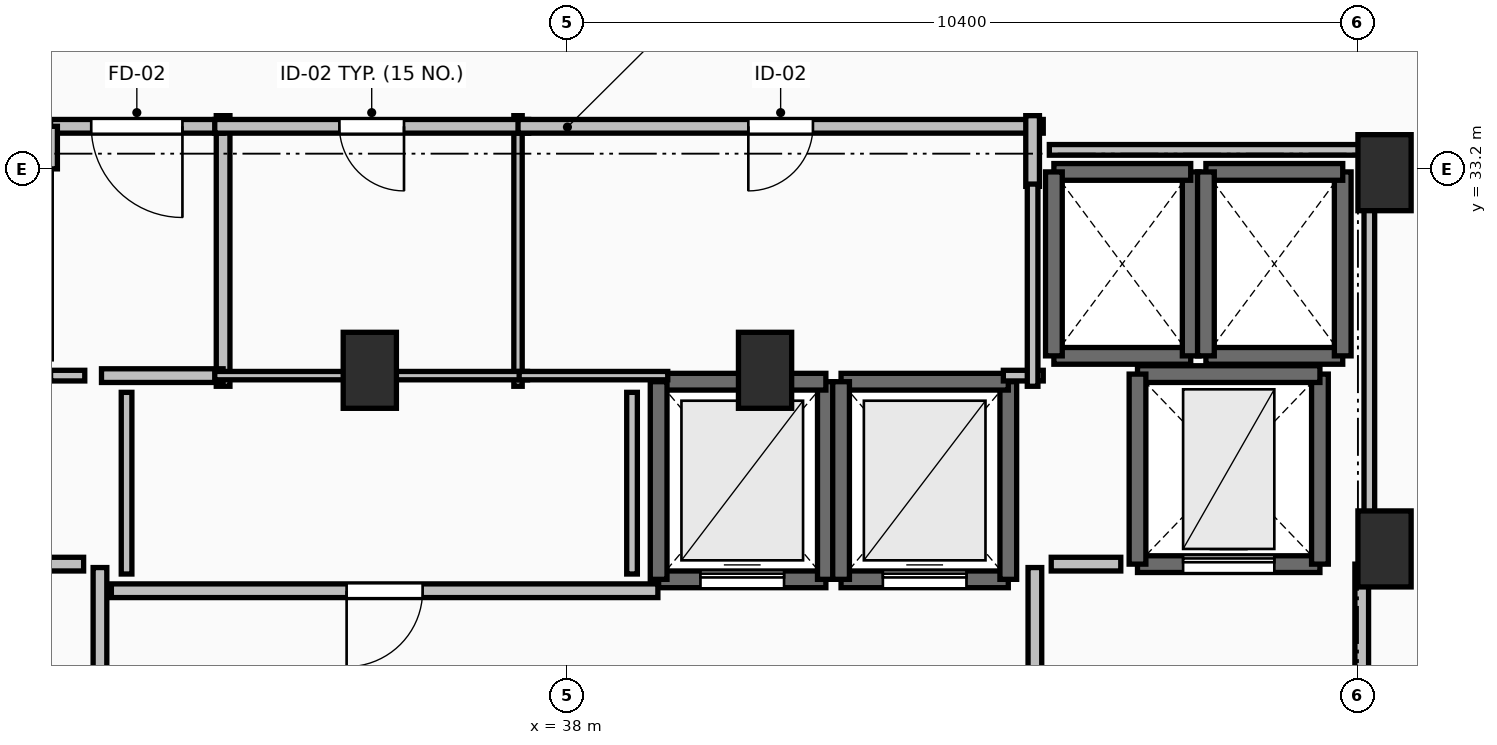
"""IFC4 building model, lengths in metres.
Left out: names, types, materials, properties, quantities, classifications, styles, units other than length and angle.
Written with IfcOpenShell. Run it as: python <this file> out.ifc"""

import sys

from ifc_helpers import new_model, si_unit, direction, frame, frame_2d, origin, origin_2d, place, context, subcontext, project, spatial, rectangle, extrude, element, fill, save


model = new_model("IFC4")
c1 = context("Model", 3, precision=1e-05, world=origin(), true_north=direction((0.0, 1.0)))
c2 = subcontext(c1, "Body", "Model", "MODEL_VIEW")
j1 = project(units=[si_unit("LENGTHUNIT", "METRE"), si_unit("PLANEANGLEUNIT", "RADIAN")], contexts=[c1])
p1 = place(None, origin())
s1 = spatial("IfcSite", under=j1, at=p1, CompositionType="ELEMENT")
p2 = place(p1, origin())
s2 = spatial("IfcBuilding", under=s1, at=p2, CompositionType="ELEMENT")
p3 = place(p2, frame((0.0, 0.0, 237.8)))
s3 = spatial("IfcBuildingStorey", under=s2, at=p3, CompositionType="ELEMENT", Elevation=237.8)
for number, where, z_axis, x_axis in (
    (1, (48.75, 33.15, 0.0), (0.0, 0.0, 1.0), (1.0, 0.0, 0.0)),
    (2, (48.75, 28.2, 0.0), (0.0, 0.0, 1.0), (1.0, 0.0, 0.0)),
    (3, (35.4, 30.55, 0.0), (0.0, 0.0, 1.0), (1.0, 0.0, 0.0)),
    (4, (40.6, 30.55, 0.0), (0.0, 0.0, 1.0), (1.0, 0.0, 0.0)),
):
    element("IfcColumn", number, at=place(p3, frame(where, z_axis=z_axis, x_axis=x_axis)), inside=s3, PredefinedType="PILASTER", context=c2, shape_type="SweptSolid", body=[
        extrude(rectangle(XDim=0.7, YDim=1.0, at=origin_2d()), origin(), (0.0, 0.0, 1.0), 3.55),
    ])
p4 = place(p3, frame((39.2, 27.8, 0.0), z_axis=(0.0, 0.0, 1.0), x_axis=(1.0, 0.0, 0.0)))
e5 = element("IfcWall", 5, at=p4, inside=s3, PredefinedType="SOLIDWALL", context=c2, shape_type="SweptSolid", body=[
    extrude(rectangle(XDim=2.2, YDim=0.22, at=frame_2d((1.1, 0.0))), origin(), (0.0, 0.0, 1.0), 3.29),
])
p5 = place(p4, frame((0.55, 0.0, 0.0)))
e6 = element("IfcOpeningElement", 6, at=p5, cuts=e5, PredefinedType="OPENING", context=c2, shape_type="SweptSolid", body=[
    extrude(rectangle(XDim=1.1, YDim=2.2, at=frame_2d((0.55, 1.1))), frame((0.0, 0.125, 0.0), z_axis=(0.0, -1.0, 0.0), x_axis=(1.0, 0.0, 0.0)), (0.0, 0.0, 1.0), 0.25),
])
p6 = place(p3, frame((41.4, 27.8, 0.0), z_axis=(0.0, 0.0, 1.0), x_axis=(0.0, 1.0, 0.0)))
e7 = element("IfcWall", 7, at=p6, inside=s3, PredefinedType="SOLIDWALL", context=c2, shape_type="SweptSolid", body=[
    extrude(rectangle(XDim=2.6, YDim=0.22, at=frame_2d((1.3, 0.0))), origin(), (0.0, 0.0, 1.0), 3.29),
])
p7 = place(p3, frame((41.4, 30.4, 0.0), z_axis=(0.0, 0.0, 1.0), x_axis=(-1.0, 0.0, 0.0)))
e8 = element("IfcWall", 8, at=p7, inside=s3, PredefinedType="SOLIDWALL", context=c2, shape_type="SweptSolid", body=[
    extrude(rectangle(XDim=2.2, YDim=0.22, at=frame_2d((1.1, 0.0))), origin(), (0.0, 0.0, 1.0), 3.29),
])
p8 = place(p3, frame((39.2, 30.4, 0.0), z_axis=(0.0, 0.0, 1.0), x_axis=(0.0, -1.0, 0.0)))
e9 = element("IfcWall", 9, at=p8, inside=s3, PredefinedType="SOLIDWALL", context=c2, shape_type="SweptSolid", body=[
    extrude(rectangle(XDim=2.6, YDim=0.22, at=frame_2d((1.3, 0.0))), origin(), (0.0, 0.0, 1.0), 3.29),
])
p9 = place(p3, frame((41.6, 27.8, 0.0), z_axis=(0.0, 0.0, 1.0), x_axis=(1.0, 0.0, 0.0)))
e10 = element("IfcWall", 10, at=p9, inside=s3, PredefinedType="SOLIDWALL", context=c2, shape_type="SweptSolid", body=[
    extrude(rectangle(XDim=2.2, YDim=0.22, at=frame_2d((1.1, 0.0))), origin(), (0.0, 0.0, 1.0), 3.29),
])
p10 = place(p9, frame((0.55, 0.0, 0.0)))
e11 = element("IfcOpeningElement", 11, at=p10, cuts=e10, PredefinedType="OPENING", context=c2, shape_type="SweptSolid", body=[
    extrude(rectangle(XDim=1.1, YDim=2.2, at=frame_2d((0.55, 1.1))), frame((0.0, 0.125, 0.0), z_axis=(0.0, -1.0, 0.0), x_axis=(1.0, 0.0, 0.0)), (0.0, 0.0, 1.0), 0.25),
])
p11 = place(p3, frame((43.8, 27.8, 0.0), z_axis=(0.0, 0.0, 1.0), x_axis=(0.0, 1.0, 0.0)))
e12 = element("IfcWall", 12, at=p11, inside=s3, PredefinedType="SOLIDWALL", context=c2, shape_type="SweptSolid", body=[
    extrude(rectangle(XDim=2.6, YDim=0.22, at=frame_2d((1.3, 0.0))), origin(), (0.0, 0.0, 1.0), 3.29),
])
p12 = place(p3, frame((43.8, 30.4, 0.0), z_axis=(0.0, 0.0, 1.0), x_axis=(-1.0, 0.0, 0.0)))
e13 = element("IfcWall", 13, at=p12, inside=s3, PredefinedType="SOLIDWALL", context=c2, shape_type="SweptSolid", body=[
    extrude(rectangle(XDim=2.2, YDim=0.22, at=frame_2d((1.1, 0.0))), origin(), (0.0, 0.0, 1.0), 3.29),
])
p13 = place(p3, frame((41.6, 30.4, 0.0), z_axis=(0.0, 0.0, 1.0), x_axis=(0.0, -1.0, 0.0)))
e14 = element("IfcWall", 14, at=p13, inside=s3, PredefinedType="SOLIDWALL", context=c2, shape_type="SweptSolid", body=[
    extrude(rectangle(XDim=2.6, YDim=0.22, at=frame_2d((1.3, 0.0))), origin(), (0.0, 0.0, 1.0), 3.29),
])
p14 = place(p3, frame((44.4, 30.74, 0.0), z_axis=(0.0, 0.0, 1.0), x_axis=(1.0, 0.0, 0.0)))
e15 = element("IfcWall", 15, at=p14, inside=s3, PredefinedType="SOLIDWALL", context=c2, shape_type="SweptSolid", body=[
    extrude(rectangle(XDim=1.8, YDim=0.22, at=frame_2d((0.9, 0.0))), origin(), (0.0, 0.0, 1.0), 3.29),
])
p15 = place(p3, frame((46.2, 30.74, 0.0), z_axis=(0.0, 0.0, 1.0), x_axis=(0.0, 1.0, 0.0)))
e16 = element("IfcWall", 16, at=p15, inside=s3, PredefinedType="SOLIDWALL", context=c2, shape_type="SweptSolid", body=[
    extrude(rectangle(XDim=2.42, YDim=0.22, at=frame_2d((1.21, 0.0))), origin(), (0.0, 0.0, 1.0), 3.29),
])
p16 = place(p3, frame((46.2, 33.16, 0.0), z_axis=(0.0, 0.0, 1.0), x_axis=(-1.0, 0.0, 0.0)))
e17 = element("IfcWall", 17, at=p16, inside=s3, PredefinedType="SOLIDWALL", context=c2, shape_type="SweptSolid", body=[
    extrude(rectangle(XDim=1.8, YDim=0.22, at=frame_2d((0.9, 0.0))), origin(), (0.0, 0.0, 1.0), 3.29),
])
p17 = place(p3, frame((44.4, 33.16, 0.0), z_axis=(0.0, 0.0, 1.0), x_axis=(0.0, -1.0, 0.0)))
e18 = element("IfcWall", 18, at=p17, inside=s3, PredefinedType="SOLIDWALL", context=c2, shape_type="SweptSolid", body=[
    extrude(rectangle(XDim=2.42, YDim=0.22, at=frame_2d((1.21, 0.0))), origin(), (0.0, 0.0, 1.0), 3.29),
])
p18 = place(p3, frame((46.4, 30.74, 0.0), z_axis=(0.0, 0.0, 1.0), x_axis=(1.0, 0.0, 0.0)))
e19 = element("IfcWall", 19, at=p18, inside=s3, PredefinedType="SOLIDWALL", context=c2, shape_type="SweptSolid", body=[
    extrude(rectangle(XDim=1.8, YDim=0.22, at=frame_2d((0.9, 0.0))), origin(), (0.0, 0.0, 1.0), 3.29),
])
p19 = place(p3, frame((48.2, 30.74, 0.0), z_axis=(0.0, 0.0, 1.0), x_axis=(0.0, 1.0, 0.0)))
e20 = element("IfcWall", 20, at=p19, inside=s3, PredefinedType="SOLIDWALL", context=c2, shape_type="SweptSolid", body=[
    extrude(rectangle(XDim=2.42, YDim=0.22, at=frame_2d((1.21, 0.0))), origin(), (0.0, 0.0, 1.0), 3.29),
])
p20 = place(p3, frame((48.2, 33.16, 0.0), z_axis=(0.0, 0.0, 1.0), x_axis=(-1.0, 0.0, 0.0)))
e21 = element("IfcWall", 21, at=p20, inside=s3, PredefinedType="SOLIDWALL", context=c2, shape_type="SweptSolid", body=[
    extrude(rectangle(XDim=1.8, YDim=0.22, at=frame_2d((0.9, 0.0))), origin(), (0.0, 0.0, 1.0), 3.29),
])
p21 = place(p3, frame((46.4, 33.16, 0.0), z_axis=(0.0, 0.0, 1.0), x_axis=(0.0, -1.0, 0.0)))
e22 = element("IfcWall", 22, at=p21, inside=s3, PredefinedType="SOLIDWALL", context=c2, shape_type="SweptSolid", body=[
    extrude(rectangle(XDim=2.42, YDim=0.22, at=frame_2d((1.21, 0.0))), origin(), (0.0, 0.0, 1.0), 3.29),
])
p22 = place(p3, frame((45.5, 28.0, 0.0), z_axis=(0.0, 0.0, 1.0), x_axis=(1.0, 0.0, 0.0)))
e23 = element("IfcWall", 23, at=p22, inside=s3, PredefinedType="SHEAR", context=c2, shape_type="SweptSolid", body=[
    extrude(rectangle(XDim=2.4, YDim=0.22, at=frame_2d((1.2, 0.0))), origin(), (0.0, 0.0, 1.0), 3.29),
])
p23 = place(p22, frame((0.6, 0.0, 0.0)))
e24 = element("IfcOpeningElement", 24, at=p23, cuts=e23, PredefinedType="OPENING", context=c2, shape_type="SweptSolid", body=[
    extrude(rectangle(XDim=1.2, YDim=2.2, at=frame_2d((0.6, 1.1))), frame((0.0, 0.125, 0.0), z_axis=(0.0, -1.0, 0.0), x_axis=(1.0, 0.0, 0.0)), (0.0, 0.0, 1.0), 0.25),
])
p24 = place(p3, frame((47.9, 28.0, 0.0), z_axis=(0.0, 0.0, 1.0), x_axis=(0.0, 1.0, 0.0)))
e25 = element("IfcWall", 25, at=p24, inside=s3, PredefinedType="SHEAR", context=c2, shape_type="SweptSolid", body=[
    extrude(rectangle(XDim=2.5, YDim=0.22, at=frame_2d((1.25, 0.0))), origin(), (0.0, 0.0, 1.0), 3.29),
])
p25 = place(p3, frame((47.9, 30.5, 0.0), z_axis=(0.0, 0.0, 1.0), x_axis=(-1.0, 0.0, 0.0)))
e26 = element("IfcWall", 26, at=p25, inside=s3, PredefinedType="SHEAR", context=c2, shape_type="SweptSolid", body=[
    extrude(rectangle(XDim=2.4, YDim=0.22, at=frame_2d((1.2, 0.0))), origin(), (0.0, 0.0, 1.0), 3.29),
])
p26 = place(p3, frame((45.5, 30.5, 0.0), z_axis=(0.0, 0.0, 1.0), x_axis=(0.0, -1.0, 0.0)))
e27 = element("IfcWall", 27, at=p26, inside=s3, PredefinedType="SHEAR", context=c2, shape_type="SweptSolid", body=[
    extrude(rectangle(XDim=2.5, YDim=0.22, at=frame_2d((1.25, 0.0))), origin(), (0.0, 0.0, 1.0), 3.29),
])
p27 = place(p3, frame((31.85, 24.045, 0.0), z_axis=(0.0, 0.0, 1.0), x_axis=(0.0, 1.0, 0.0)))
e28 = element("IfcWall", 28, at=p27, inside=s3, PredefinedType="PARTITIONING", context=c2, shape_type="SweptSolid", body=[
    extrude(rectangle(XDim=3.91, YDim=0.18, at=frame_2d((1.955, 0.0))), origin(), (0.0, 0.0, 1.0), 3.29),
])
p28 = place(p27, frame((1.355, 0.0, 0.0)))
e29 = element("IfcOpeningElement", 29, at=p28, cuts=e28, PredefinedType="OPENING", context=c2, shape_type="SweptSolid", body=[
    extrude(rectangle(XDim=1.2, YDim=2.15, at=frame_2d((0.6, 1.075))), frame((0.0, 0.105, 0.0), z_axis=(0.0, -1.0, 0.0), x_axis=(1.0, 0.0, 0.0)), (0.0, 0.0, 1.0), 0.21),
])
p29 = place(p3, frame((44.15, 27.955, 0.0), z_axis=(0.0, 0.0, 1.0), x_axis=(0.0, -1.0, 0.0)))
e30 = element("IfcWall", 30, at=p29, inside=s3, PredefinedType="PARTITIONING", context=c2, shape_type="SweptSolid", body=[
    extrude(rectangle(XDim=3.91, YDim=0.18, at=frame_2d((1.955, 0.0))), origin(), (0.0, 0.0, 1.0), 3.29),
])
p30 = place(p29, frame((1.355, 0.0, 0.0)))
e31 = element("IfcOpeningElement", 31, at=p30, cuts=e30, PredefinedType="OPENING", context=c2, shape_type="SweptSolid", body=[
    extrude(rectangle(XDim=1.2, YDim=2.15, at=frame_2d((0.6, 1.075))), frame((0.0, 0.105, 0.0), z_axis=(0.0, -1.0, 0.0), x_axis=(1.0, 0.0, 0.0)), (0.0, 0.0, 1.0), 0.21),
])
p31 = place(p3, frame((48.45, 23.95, 0.0), z_axis=(0.0, 0.0, 1.0), x_axis=(0.0, 1.0, 0.0)))
e32 = element("IfcWall", 32, at=p31, inside=s3, PredefinedType="PARTITIONING", context=c2, shape_type="SweptSolid", body=[
    extrude(rectangle(XDim=4.05, YDim=0.18, at=frame_2d((2.025, 0.0))), origin(), (0.0, 0.0, 1.0), 3.29),
])
p32 = place(p31, frame((1.425, 0.0, 0.0)))
e33 = element("IfcOpeningElement", 33, at=p32, cuts=e32, PredefinedType="OPENING", context=c2, shape_type="SweptSolid", body=[
    extrude(rectangle(XDim=1.2, YDim=2.15, at=frame_2d((0.6, 1.075))), frame((0.0, 0.105, 0.0), z_axis=(0.0, -1.0, 0.0), x_axis=(1.0, 0.0, 0.0)), (0.0, 0.0, 1.0), 0.21),
])
p33 = place(p3, frame((33.47, 30.34, 0.0), z_axis=(0.0, 0.0, 1.0), x_axis=(0.0, 1.0, 0.0)))
e34 = element("IfcWall", 34, at=p33, inside=s3, PredefinedType="PARTITIONING", context=c2, shape_type="SweptSolid", body=[
    extrude(rectangle(XDim=3.56, YDim=0.18, at=frame_2d((1.78, 0.0))), origin(), (0.0, 0.0, 1.0), 3.29),
])
p34 = place(p3, frame((31.87, 30.48, 0.0), z_axis=(0.0, 0.0, 1.0), x_axis=(1.0, 0.0, 0.0)))
e35 = element("IfcWall", 35, at=p34, inside=s3, PredefinedType="PARTITIONING", context=c2, shape_type="SweptSolid", body=[
    extrude(rectangle(XDim=1.6, YDim=0.18, at=frame_2d((0.8, 0.0))), origin(), (0.0, 0.0, 1.0), 3.29),
])
p35 = place(p3, frame((33.47, 33.76, 0.0), z_axis=(0.0, 0.0, 1.0), x_axis=(-1.0, 0.0, 0.0)))
e36 = element("IfcWall", 36, at=p35, inside=s3, PredefinedType="PARTITIONING", context=c2, shape_type="SweptSolid", body=[
    extrude(rectangle(XDim=2.27, YDim=0.18, at=frame_2d((1.135, 0.0))), origin(), (0.0, 0.0, 1.0), 3.29),
])
p36 = place(p35, frame((0.535, 0.0, 0.0)))
e37 = element("IfcOpeningElement", 37, at=p36, cuts=e36, PredefinedType="OPENING", context=c2, shape_type="SweptSolid", body=[
    extrude(rectangle(XDim=1.2, YDim=2.15, at=frame_2d((0.6, 1.075))), frame((0.0, 0.105, 0.0), z_axis=(0.0, -1.0, 0.0), x_axis=(1.0, 0.0, 0.0)), (0.0, 0.0, 1.0), 0.21),
])
p37 = place(p3, frame((31.2, 33.76, 0.0), z_axis=(0.0, 0.0, 1.0), x_axis=(0.0, -1.0, 0.0)))
e38 = element("IfcWall", 38, at=p37, inside=s3, PredefinedType="PARTITIONING", context=c2, shape_type="SweptSolid", body=[
    extrude(rectangle(XDim=0.56, YDim=0.18, at=frame_2d((0.28, 0.0))), origin(), (0.0, 0.0, 1.0), 3.29),
])
p38 = place(p3, frame((39.19, 27.65, 0.0), z_axis=(0.0, 0.0, 1.0), x_axis=(-1.0, 0.0, 0.0)))
e39 = element("IfcWall", 39, at=p38, inside=s3, PredefinedType="PARTITIONING", context=c2, shape_type="SweptSolid", body=[
    extrude(rectangle(XDim=7.19, YDim=0.18, at=frame_2d((3.595, 0.0))), origin(), (0.0, 0.0, 1.0), 3.29),
])
p39 = place(p38, frame((3.095, 0.0, 0.0)))
e40 = element("IfcOpeningElement", 40, at=p39, cuts=e39, PredefinedType="OPENING", context=c2, shape_type="SweptSolid", body=[
    extrude(rectangle(XDim=1.0, YDim=2.15, at=frame_2d((0.5, 1.075))), frame((0.0, 0.105, 0.0), z_axis=(0.0, -1.0, 0.0), x_axis=(1.0, 0.0, 0.0)), (0.0, 0.0, 1.0), 0.21),
])
p40 = place(p3, frame((37.35, 30.34, 0.0), z_axis=(0.0, 0.0, 1.0), x_axis=(0.0, 1.0, 0.0)))
e41 = element("IfcWall", 41, at=p40, inside=s3, PredefinedType="PARTITIONING", context=c2, shape_type="SweptSolid", body=[
    extrude(rectangle(XDim=3.56, YDim=0.11, at=frame_2d((1.78, 0.0))), origin(), (0.0, 0.0, 1.0), 2.482),
])
p41 = place(p3, frame((33.36, 30.48, 0.0), z_axis=(0.0, 0.0, 1.0), x_axis=(1.0, 0.0, 0.0)))
e42 = element("IfcWall", 42, at=p41, inside=s3, PredefinedType="PARTITIONING", context=c2, shape_type="SweptSolid", body=[
    extrude(rectangle(XDim=4.115, YDim=0.11, at=frame_2d((2.058, 0.0))), origin(), (0.0, 0.0, 1.0), 2.482),
])
p42 = place(p3, frame((37.49, 33.76, 0.0), z_axis=(0.0, 0.0, 1.0), x_axis=(-1.0, 0.0, 0.0)))
e43 = element("IfcWall", 43, at=p42, inside=s3, PredefinedType="PARTITIONING", context=c2, shape_type="SweptSolid", body=[
    extrude(rectangle(XDim=4.13, YDim=0.18, at=frame_2d((2.065, 0.0))), origin(), (0.0, 0.0, 1.0), 3.29),
])
p43 = place(p42, frame((1.64, 0.0, 0.0)))
e44 = element("IfcOpeningElement", 44, at=p43, cuts=e43, PredefinedType="OPENING", context=c2, shape_type="SweptSolid", body=[
    extrude(rectangle(XDim=0.85, YDim=2.1, at=frame_2d((0.425, 1.05))), frame((0.0, 0.105, 0.0), z_axis=(0.0, -1.0, 0.0), x_axis=(1.0, 0.0, 0.0)), (0.0, 0.0, 1.0), 0.21),
])
p44 = place(p3, frame((37.365, 30.48, 0.0), z_axis=(0.0, 0.0, 1.0), x_axis=(1.0, 0.0, 0.0)))
e45 = element("IfcWall", 45, at=p44, inside=s3, PredefinedType="PARTITIONING", context=c2, shape_type="SweptSolid", body=[
    extrude(rectangle(XDim=1.955, YDim=0.11, at=frame_2d((0.978, 0.0))), origin(), (0.0, 0.0, 1.0), 2.482),
])
p45 = place(p3, frame((44.26, 33.76, 0.0), z_axis=(0.0, 0.0, 1.0), x_axis=(-1.0, 0.0, 0.0)))
e46 = element("IfcWall", 46, at=p45, inside=s3, PredefinedType="PARTITIONING", context=c2, shape_type="SweptSolid", body=[
    extrude(rectangle(XDim=6.91, YDim=0.18, at=frame_2d((3.455, 0.0))), origin(), (0.0, 0.0, 1.0), 3.29),
])
p46 = place(p45, frame((3.03, 0.0, 0.0)))
e47 = element("IfcOpeningElement", 47, at=p46, cuts=e46, PredefinedType="OPENING", context=c2, shape_type="SweptSolid", body=[
    extrude(rectangle(XDim=0.85, YDim=2.1, at=frame_2d((0.425, 1.05))), frame((0.0, 0.105, 0.0), z_axis=(0.0, -1.0, 0.0), x_axis=(1.0, 0.0, 0.0)), (0.0, 0.0, 1.0), 0.21),
])
p47 = place(p3, frame((44.12, 32.97, 0.0), z_axis=(0.0, 0.0, 1.0), x_axis=(0.0, 1.0, 0.0)))
e48 = element("IfcWall", 48, at=p47, inside=s3, PredefinedType="PARTITIONING", context=c2, shape_type="SweptSolid", body=[
    extrude(rectangle(XDim=0.93, YDim=0.18, at=frame_2d((0.465, 0.0))), origin(), (0.0, 0.0, 1.0), 3.29),
])
for number, where, z_axis, x_axis in (
    (49, (31.635, 28.0, 0.0), (0.0, 0.0, 1.0), (-1.0, 0.0, 0.0)),
    (50, (45.28, 28.0, 0.0), (0.0, 0.0, 1.0), (-1.0, 0.0, 0.0)),
):
    element("IfcWall", number, at=place(p3, frame(where, z_axis=z_axis, x_axis=x_axis)), inside=s3, PredefinedType="PARTITIONING", context=c2, shape_type="SweptSolid", body=[
        extrude(rectangle(XDim=0.915, YDim=0.18, at=frame_2d((0.458, 0.0))), origin(), (0.0, 0.0, 1.0), 3.29),
    ])
p48 = place(p3, frame((31.2, 30.48, 0.0), z_axis=(0.0, 0.0, 1.0), x_axis=(1.0, 0.0, 0.0)))
e51 = element("IfcWall", 51, at=p48, inside=s3, PredefinedType="PARTITIONING", context=c2, shape_type="SweptSolid", body=[
    extrude(rectangle(XDim=0.45, YDim=0.14, at=frame_2d((0.225, 0.0))), origin(), (0.0, 0.0, 1.0), 3.29),
])
p49 = place(p3, frame((43.735, 30.48, 0.0), z_axis=(0.0, 0.0, 1.0), x_axis=(1.0, 0.0, 0.0)))
e52 = element("IfcWall", 52, at=p49, inside=s3, PredefinedType="PARTITIONING", context=c2, shape_type="SweptSolid", body=[
    extrude(rectangle(XDim=0.525, YDim=0.14, at=frame_2d((0.262, 0.0))), origin(), (0.0, 0.0, 1.0), 3.29),
])
p50 = place(p3, frame((44.12, 30.34, 0.0), z_axis=(0.0, 0.0, 1.0), x_axis=(0.0, 1.0, 0.0)))
e53 = element("IfcWall", 53, at=p50, inside=s3, PredefinedType="PARTITIONING", context=c2, shape_type="SweptSolid", body=[
    extrude(rectangle(XDim=2.66, YDim=0.14, at=frame_2d((1.33, 0.0))), origin(), (0.0, 0.0, 1.0), 3.29),
])
for number, where, z_axis, x_axis in (
    (54, (32.2, 30.26, 0.0), (0.0, 0.0, 1.0), (0.0, -1.0, 0.0)),
    (55, (38.85, 27.87, 0.0), (0.0, 0.0, 1.0), (0.0, 1.0, 0.0)),
):
    element("IfcWall", number, at=place(p3, frame(where, z_axis=z_axis, x_axis=x_axis)), inside=s3, PredefinedType="PARTITIONING", context=c2, shape_type="SweptSolid", body=[
        extrude(rectangle(XDim=2.39, YDim=0.14, at=frame_2d((1.195, 0.0))), origin(), (0.0, 0.0, 1.0), 3.29),
    ])
p51 = place(p3, frame((48.55, 28.196, 0.0), z_axis=(0.0, 0.0, 1.0), x_axis=(0.0, 1.0, 0.0)))
e56 = element("IfcWall", 56, at=p51, inside=s3, PredefinedType="PARTITIONING", context=c2, shape_type="SweptSolid", body=[
    extrude(rectangle(XDim=5.254, YDim=0.14, at=frame_2d((2.627, 0.0))), origin(), (0.0, 0.0, 1.0), 2.482),
])
p52 = place(p3, frame((48.55, 33.45, 0.0), z_axis=(0.0, 0.0, 1.0), x_axis=(-1.0, 0.0, 0.0)))
e57 = element("IfcWall", 57, at=p52, inside=s3, PredefinedType="PARTITIONING", context=c2, shape_type="SweptSolid", body=[
    extrude(rectangle(XDim=4.21, YDim=0.14, at=frame_2d((2.105, 0.0))), origin(), (0.0, 0.0, 1.0), 2.482),
])
p53 = place(p5, origin())
e58 = element("IfcDoor", 58, at=p53, inside=s3, OperationType="SLIDING_TO_LEFT", PredefinedType="DOOR", context=c2, shape_type="SweptSolid", body=[
    extrude(rectangle(XDim=1.1, YDim=2.2, at=frame_2d((0.55, 1.1))), frame((0.0, 0.025, 0.0), z_axis=(0.0, -1.0, 0.0), x_axis=(1.0, 0.0, 0.0)), (0.0, 0.0, 1.0), 0.05),
])
fill(e6, e58)
p54 = place(p10, origin())
e59 = element("IfcDoor", 59, at=p54, inside=s3, OperationType="SLIDING_TO_LEFT", PredefinedType="DOOR", context=c2, shape_type="SweptSolid", body=[
    extrude(rectangle(XDim=1.1, YDim=2.2, at=frame_2d((0.55, 1.1))), frame((0.0, 0.025, 0.0), z_axis=(0.0, -1.0, 0.0), x_axis=(1.0, 0.0, 0.0)), (0.0, 0.0, 1.0), 0.05),
])
fill(e11, e59)
p55 = place(p23, origin())
e60 = element("IfcDoor", 60, at=p55, inside=s3, OperationType="SLIDING_TO_LEFT", PredefinedType="DOOR", context=c2, shape_type="SweptSolid", body=[
    extrude(rectangle(XDim=1.2, YDim=2.2, at=frame_2d((0.6, 1.1))), frame((0.0, 0.025, 0.0), z_axis=(0.0, -1.0, 0.0), x_axis=(1.0, 0.0, 0.0)), (0.0, 0.0, 1.0), 0.05),
])
fill(e24, e60)
p56 = place(p36, origin())
e61 = element("IfcDoor", 61, at=p56, inside=s3, OperationType="SINGLE_SWING_LEFT", PredefinedType="DOOR", context=c2, shape_type="SweptSolid", body=[
    extrude(rectangle(XDim=1.2, YDim=2.15, at=frame_2d((0.6, 1.075))), frame((0.0, 0.025, 0.0), z_axis=(0.0, -1.0, 0.0), x_axis=(1.0, 0.0, 0.0)), (0.0, 0.0, 1.0), 0.05),
])
fill(e37, e61)
p57 = place(p39, origin())
e62 = element("IfcDoor", 62, at=p57, inside=s3, OperationType="SINGLE_SWING_RIGHT", PredefinedType="DOOR", context=c2, shape_type="SweptSolid", body=[
    extrude(rectangle(XDim=1.0, YDim=2.15, at=frame_2d((0.5, 1.075))), frame((0.0, 0.025, 0.0), z_axis=(0.0, -1.0, 0.0), x_axis=(1.0, 0.0, 0.0)), (0.0, 0.0, 1.0), 0.05),
])
fill(e40, e62)
p58 = place(p43, origin())
e63 = element("IfcDoor", 63, at=p58, inside=s3, OperationType="SINGLE_SWING_LEFT", PredefinedType="DOOR", context=c2, shape_type="SweptSolid", body=[
    extrude(rectangle(XDim=0.85, YDim=2.1, at=frame_2d((0.425, 1.05))), frame((0.0, 0.025, 0.0), z_axis=(0.0, -1.0, 0.0), x_axis=(1.0, 0.0, 0.0)), (0.0, 0.0, 1.0), 0.05),
])
fill(e44, e63)
p59 = place(p46, origin())
e64 = element("IfcDoor", 64, at=p59, inside=s3, OperationType="SINGLE_SWING_RIGHT", PredefinedType="DOOR", context=c2, shape_type="SweptSolid", body=[
    extrude(rectangle(XDim=0.85, YDim=2.1, at=frame_2d((0.425, 1.05))), frame((0.0, 0.025, 0.0), z_axis=(0.0, -1.0, 0.0), x_axis=(1.0, 0.0, 0.0)), (0.0, 0.0, 1.0), 0.05),
])
fill(e47, e64)
save(model, sys.argv[1])
